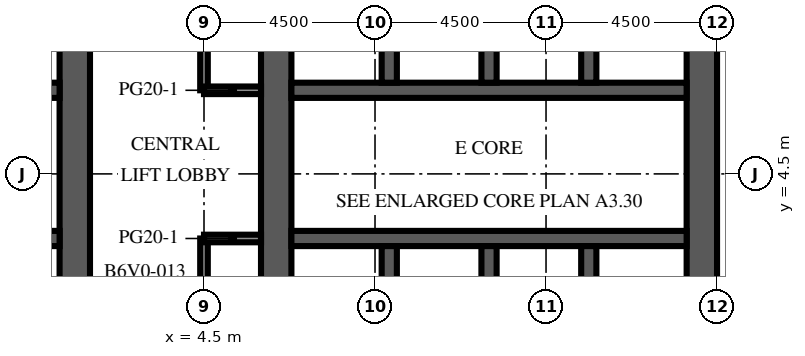
"""IFC4 building model, lengths in metres.
Left out: names, types, materials, properties, quantities, classifications, styles, units other than length and angle.
Written with IfcOpenShell. Run it as: python <this file> out.ifc"""

import sys

from ifc_helpers import new_model, si_unit, direction, frame, frame_2d, origin, place, context, subcontext, project, spatial, rectangle, extrude, element, fill, save


model = new_model("IFC4")
c1 = context("Model", 3, precision=1e-05, world=origin(), true_north=direction((0.0, 1.0)))
c2 = subcontext(c1, "Body", "Model", "MODEL_VIEW")
j1 = project(units=[si_unit("LENGTHUNIT", "METRE"), si_unit("PLANEANGLEUNIT", "RADIAN")], contexts=[c1])
p1 = place(None, origin())
s1 = spatial("IfcSite", under=j1, at=p1, CompositionType="ELEMENT")
p2 = place(p1, origin())
s2 = spatial("IfcBuilding", under=s1, at=p2, CompositionType="ELEMENT")
p3 = place(p2, frame((0.0, 0.0, 195.6)))
s3 = spatial("IfcBuildingStorey", under=s2, at=p3, CompositionType="ELEMENT", Elevation=195.6)
p4 = place(p3, frame((1.1, -9.0, 0.0), z_axis=(0.0, 0.0, 1.0), x_axis=(0.0, 1.0, 0.0)))
e1 = element("IfcWall", 1, at=p4, inside=s3, PredefinedType="SHEAR", context=c2, shape_type="SweptSolid", body=[
    extrude(rectangle(XDim=27.5, YDim=0.8, at=frame_2d((13.75, 0.0))), origin(), (0.0, 0.0, 1.0), 4.1),
])
p5 = place(p4, frame((12.55, 0.0, 0.0)))
e2 = element("IfcOpeningElement", 2, at=p5, cuts=e1, PredefinedType="OPENING", context=c2, shape_type="SweptSolid", body=[
    extrude(rectangle(XDim=2.4, YDim=2.4, at=frame_2d((1.2, 1.2))), frame((0.0, 0.41, 0.0), z_axis=(0.0, -1.0, 0.0), x_axis=(1.0, 0.0, 0.0)), (0.0, 0.0, 1.0), 0.82),
])
p6 = place(p4, frame((3.95, 0.0, 0.0)))
e3 = element("IfcOpeningElement", 3, at=p6, cuts=e1, PredefinedType="OPENING", context=c2, shape_type="SweptSolid", body=[
    extrude(rectangle(XDim=1.2, YDim=2.1, at=frame_2d((0.6, 1.05))), frame((0.0, 0.41, 0.0), z_axis=(0.0, -1.0, 0.0), x_axis=(1.0, 0.0, 0.0)), (0.0, 0.0, 1.0), 0.82),
])
p7 = place(p4, frame((19.45, 0.0, 0.0)))
e4 = element("IfcOpeningElement", 4, at=p7, cuts=e1, PredefinedType="OPENING", context=c2, shape_type="SweptSolid", body=[
    extrude(rectangle(XDim=1.0, YDim=2.1, at=frame_2d((0.5, 1.05))), frame((0.0, 0.41, 0.0), z_axis=(0.0, -1.0, 0.0), x_axis=(1.0, 0.0, 0.0)), (0.0, 0.0, 1.0), 0.82),
])
p8 = place(p4, frame((21.137, 0.0, 0.0)))
e5 = element("IfcOpeningElement", 5, at=p8, cuts=e1, PredefinedType="OPENING", context=c2, shape_type="SweptSolid", body=[
    extrude(rectangle(XDim=1.0, YDim=2.1, at=frame_2d((0.5, 1.05))), frame((0.0, 0.41, 0.0), z_axis=(0.0, -1.0, 0.0), x_axis=(1.0, 0.0, 0.0)), (0.0, 0.0, 1.0), 0.82),
])
p9 = place(p4, frame((23.2, 0.0, 0.0)))
e6 = element("IfcOpeningElement", 6, at=p9, cuts=e1, PredefinedType="OPENING", context=c2, shape_type="SweptSolid", body=[
    extrude(rectangle(XDim=1.0, YDim=2.1, at=frame_2d((0.5, 1.05))), frame((0.0, 0.41, 0.0), z_axis=(0.0, -1.0, 0.0), x_axis=(1.0, 0.0, 0.0)), (0.0, 0.0, 1.0), 0.82),
])
p10 = place(p4, frame((25.262, 0.0, 0.0)))
e7 = element("IfcOpeningElement", 7, at=p10, cuts=e1, PredefinedType="OPENING", context=c2, shape_type="SweptSolid", body=[
    extrude(rectangle(XDim=1.0, YDim=2.1, at=frame_2d((0.5, 1.05))), frame((0.0, 0.41, 0.0), z_axis=(0.0, -1.0, 0.0), x_axis=(1.0, 0.0, 0.0)), (0.0, 0.0, 1.0), 0.82),
])
p11 = place(p3, frame((-9.7, 2.8, 0.0), z_axis=(0.0, 0.0, 1.0), x_axis=(1.0, 0.0, 0.0)))
e8 = element("IfcWall", 8, at=p11, inside=s3, PredefinedType="SHEAR", context=c2, shape_type="SweptSolid", body=[
    extrude(rectangle(XDim=10.4, YDim=0.4, at=frame_2d((5.2, 0.0))), origin(), (0.0, 0.0, 1.0), 4.1),
])
p12 = place(p11, frame((0.738, 0.0, 0.0)))
e9 = element("IfcOpeningElement", 9, at=p12, cuts=e8, PredefinedType="OPENING", context=c2, shape_type="SweptSolid", body=[
    extrude(rectangle(XDim=1.1, YDim=2.1, at=frame_2d((0.55, 1.05))), frame((0.0, 0.21, 0.0), z_axis=(0.0, -1.0, 0.0), x_axis=(1.0, 0.0, 0.0)), (0.0, 0.0, 1.0), 0.42),
])
p13 = place(p11, frame((3.337, 0.0, 0.0)))
e10 = element("IfcOpeningElement", 10, at=p13, cuts=e8, PredefinedType="OPENING", context=c2, shape_type="SweptSolid", body=[
    extrude(rectangle(XDim=1.1, YDim=2.1, at=frame_2d((0.55, 1.05))), frame((0.0, 0.21, 0.0), z_axis=(0.0, -1.0, 0.0), x_axis=(1.0, 0.0, 0.0)), (0.0, 0.0, 1.0), 0.42),
])
p14 = place(p11, frame((6.012, 0.0, 0.0)))
e11 = element("IfcOpeningElement", 11, at=p14, cuts=e8, PredefinedType="OPENING", context=c2, shape_type="SweptSolid", body=[
    extrude(rectangle(XDim=1.0, YDim=2.1, at=frame_2d((0.5, 1.05))), frame((0.0, 0.21, 0.0), z_axis=(0.0, -1.0, 0.0), x_axis=(1.0, 0.0, 0.0)), (0.0, 0.0, 1.0), 0.42),
])
p15 = place(p11, frame((8.613, 0.0, 0.0)))
e12 = element("IfcOpeningElement", 12, at=p15, cuts=e8, PredefinedType="OPENING", context=c2, shape_type="SweptSolid", body=[
    extrude(rectangle(XDim=1.0, YDim=2.1, at=frame_2d((0.5, 1.05))), frame((0.0, 0.21, 0.0), z_axis=(0.0, -1.0, 0.0), x_axis=(1.0, 0.0, 0.0)), (0.0, 0.0, 1.0), 0.42),
])
p16 = place(p3, frame((-9.7, 6.7, 0.0), z_axis=(0.0, 0.0, 1.0), x_axis=(1.0, 0.0, 0.0)))
e13 = element("IfcWall", 13, at=p16, inside=s3, PredefinedType="SHEAR", context=c2, shape_type="SweptSolid", body=[
    extrude(rectangle(XDim=10.4, YDim=0.4, at=frame_2d((5.2, 0.0))), origin(), (0.0, 0.0, 1.0), 4.1),
])
p17 = place(p16, frame((3.337, 0.0, 0.0)))
e14 = element("IfcOpeningElement", 14, at=p17, cuts=e13, PredefinedType="OPENING", context=c2, shape_type="SweptSolid", body=[
    extrude(rectangle(XDim=1.1, YDim=2.1, at=frame_2d((0.55, 1.05))), frame((0.0, 0.21, 0.0), z_axis=(0.0, -1.0, 0.0), x_axis=(1.0, 0.0, 0.0)), (0.0, 0.0, 1.0), 0.42),
])
p18 = place(p16, frame((5.962, 0.0, 0.0)))
e15 = element("IfcOpeningElement", 15, at=p18, cuts=e13, PredefinedType="OPENING", context=c2, shape_type="SweptSolid", body=[
    extrude(rectangle(XDim=1.1, YDim=2.1, at=frame_2d((0.55, 1.05))), frame((0.0, 0.21, 0.0), z_axis=(0.0, -1.0, 0.0), x_axis=(1.0, 0.0, 0.0)), (0.0, 0.0, 1.0), 0.42),
])
p19 = place(p16, frame((8.663, 0.0, 0.0)))
e16 = element("IfcOpeningElement", 16, at=p19, cuts=e13, PredefinedType="OPENING", context=c2, shape_type="SweptSolid", body=[
    extrude(rectangle(XDim=1.1, YDim=2.1, at=frame_2d((0.55, 1.05))), frame((0.0, 0.21, 0.0), z_axis=(0.0, -1.0, 0.0), x_axis=(1.0, 0.0, 0.0)), (0.0, 0.0, 1.0), 0.42),
])
p20 = place(p16, frame((0.688, 0.0, 0.0)))
e17 = element("IfcOpeningElement", 17, at=p20, cuts=e13, PredefinedType="OPENING", context=c2, shape_type="SweptSolid", body=[
    extrude(rectangle(XDim=1.0, YDim=2.1, at=frame_2d((0.5, 1.05))), frame((0.0, 0.21, 0.0), z_axis=(0.0, -1.0, 0.0), x_axis=(1.0, 0.0, 0.0)), (0.0, 0.0, 1.0), 0.42),
])
p21 = place(p3, frame((6.4, -9.0, 0.0), z_axis=(0.0, 0.0, 1.0), x_axis=(0.0, 1.0, 0.0)))
e18 = element("IfcWall", 18, at=p21, inside=s3, PredefinedType="SHEAR", context=c2, shape_type="SweptSolid", body=[
    extrude(rectangle(XDim=27.5, YDim=0.8, at=frame_2d((13.75, 0.0))), origin(), (0.0, 0.0, 1.0), 4.1),
])
p22 = place(p21, frame((12.55, 0.0, 0.0)))
e19 = element("IfcOpeningElement", 19, at=p22, cuts=e18, PredefinedType="OPENING", context=c2, shape_type="SweptSolid", body=[
    extrude(rectangle(XDim=2.4, YDim=2.4, at=frame_2d((1.2, 1.2))), frame((0.0, 0.41, 0.0), z_axis=(0.0, -1.0, 0.0), x_axis=(1.0, 0.0, 0.0)), (0.0, 0.0, 1.0), 0.82),
])
p23 = place(p21, frame((3.95, 0.0, 0.0)))
e20 = element("IfcOpeningElement", 20, at=p23, cuts=e18, PredefinedType="OPENING", context=c2, shape_type="SweptSolid", body=[
    extrude(rectangle(XDim=1.2, YDim=2.1, at=frame_2d((0.6, 1.05))), frame((0.0, 0.41, 0.0), z_axis=(0.0, -1.0, 0.0), x_axis=(1.0, 0.0, 0.0)), (0.0, 0.0, 1.0), 0.82),
])
p24 = place(p21, frame((19.45, 0.0, 0.0)))
e21 = element("IfcOpeningElement", 21, at=p24, cuts=e18, PredefinedType="OPENING", context=c2, shape_type="SweptSolid", body=[
    extrude(rectangle(XDim=1.0, YDim=2.1, at=frame_2d((0.5, 1.05))), frame((0.0, 0.41, 0.0), z_axis=(0.0, -1.0, 0.0), x_axis=(1.0, 0.0, 0.0)), (0.0, 0.0, 1.0), 0.82),
])
p25 = place(p21, frame((21.137, 0.0, 0.0)))
e22 = element("IfcOpeningElement", 22, at=p25, cuts=e18, PredefinedType="OPENING", context=c2, shape_type="SweptSolid", body=[
    extrude(rectangle(XDim=1.0, YDim=2.1, at=frame_2d((0.5, 1.05))), frame((0.0, 0.41, 0.0), z_axis=(0.0, -1.0, 0.0), x_axis=(1.0, 0.0, 0.0)), (0.0, 0.0, 1.0), 0.82),
])
p26 = place(p21, frame((23.2, 0.0, 0.0)))
e23 = element("IfcOpeningElement", 23, at=p26, cuts=e18, PredefinedType="OPENING", context=c2, shape_type="SweptSolid", body=[
    extrude(rectangle(XDim=1.0, YDim=2.1, at=frame_2d((0.5, 1.05))), frame((0.0, 0.41, 0.0), z_axis=(0.0, -1.0, 0.0), x_axis=(1.0, 0.0, 0.0)), (0.0, 0.0, 1.0), 0.82),
])
p27 = place(p21, frame((25.262, 0.0, 0.0)))
e24 = element("IfcOpeningElement", 24, at=p27, cuts=e18, PredefinedType="OPENING", context=c2, shape_type="SweptSolid", body=[
    extrude(rectangle(XDim=1.0, YDim=2.1, at=frame_2d((0.5, 1.05))), frame((0.0, 0.41, 0.0), z_axis=(0.0, -1.0, 0.0), x_axis=(1.0, 0.0, 0.0)), (0.0, 0.0, 1.0), 0.82),
])
p28 = place(p3, frame((17.6, -9.0, 0.0), z_axis=(0.0, 0.0, 1.0), x_axis=(0.0, 1.0, 0.0)))
e25 = element("IfcWall", 25, at=p28, inside=s3, PredefinedType="SHEAR", context=c2, shape_type="SweptSolid", body=[
    extrude(rectangle(XDim=27.5, YDim=0.8, at=frame_2d((13.75, 0.0))), origin(), (0.0, 0.0, 1.0), 4.1),
])
p29 = place(p28, frame((12.55, 0.0, 0.0)))
e26 = element("IfcOpeningElement", 26, at=p29, cuts=e25, PredefinedType="OPENING", context=c2, shape_type="SweptSolid", body=[
    extrude(rectangle(XDim=2.4, YDim=2.4, at=frame_2d((1.2, 1.2))), frame((0.0, 0.41, 0.0), z_axis=(0.0, -1.0, 0.0), x_axis=(1.0, 0.0, 0.0)), (0.0, 0.0, 1.0), 0.82),
])
p30 = place(p28, frame((6.825, 0.0, 0.0)))
e27 = element("IfcOpeningElement", 27, at=p30, cuts=e25, PredefinedType="OPENING", context=c2, shape_type="SweptSolid", body=[
    extrude(rectangle(XDim=1.2, YDim=2.1, at=frame_2d((0.6, 1.05))), frame((0.0, 0.41, 0.0), z_axis=(0.0, -1.0, 0.0), x_axis=(1.0, 0.0, 0.0)), (0.0, 0.0, 1.0), 0.82),
])
p31 = place(p28, frame((19.475, 0.0, 0.0)))
e28 = element("IfcOpeningElement", 28, at=p31, cuts=e25, PredefinedType="OPENING", context=c2, shape_type="SweptSolid", body=[
    extrude(rectangle(XDim=1.2, YDim=2.1, at=frame_2d((0.6, 1.05))), frame((0.0, 0.41, 0.0), z_axis=(0.0, -1.0, 0.0), x_axis=(1.0, 0.0, 0.0)), (0.0, 0.0, 1.0), 0.82),
])
p32 = place(p3, frame((6.8, 2.8, 0.0), z_axis=(0.0, 0.0, 1.0), x_axis=(1.0, 0.0, 0.0)))
e29 = element("IfcWall", 29, at=p32, inside=s3, PredefinedType="SHEAR", context=c2, shape_type="SweptSolid", body=[
    extrude(rectangle(XDim=10.4, YDim=0.4, at=frame_2d((5.2, 0.0))), origin(), (0.0, 0.0, 1.0), 4.1),
])
p33 = place(p32, frame((0.738, 0.0, 0.0)))
e30 = element("IfcOpeningElement", 30, at=p33, cuts=e29, PredefinedType="OPENING", context=c2, shape_type="SweptSolid", body=[
    extrude(rectangle(XDim=1.1, YDim=2.1, at=frame_2d((0.55, 1.05))), frame((0.0, 0.21, 0.0), z_axis=(0.0, -1.0, 0.0), x_axis=(1.0, 0.0, 0.0)), (0.0, 0.0, 1.0), 0.42),
])
p34 = place(p32, frame((3.337, 0.0, 0.0)))
e31 = element("IfcOpeningElement", 31, at=p34, cuts=e29, PredefinedType="OPENING", context=c2, shape_type="SweptSolid", body=[
    extrude(rectangle(XDim=1.1, YDim=2.1, at=frame_2d((0.55, 1.05))), frame((0.0, 0.21, 0.0), z_axis=(0.0, -1.0, 0.0), x_axis=(1.0, 0.0, 0.0)), (0.0, 0.0, 1.0), 0.42),
])
p35 = place(p32, frame((6.012, 0.0, 0.0)))
e32 = element("IfcOpeningElement", 32, at=p35, cuts=e29, PredefinedType="OPENING", context=c2, shape_type="SweptSolid", body=[
    extrude(rectangle(XDim=1.0, YDim=2.1, at=frame_2d((0.5, 1.05))), frame((0.0, 0.21, 0.0), z_axis=(0.0, -1.0, 0.0), x_axis=(1.0, 0.0, 0.0)), (0.0, 0.0, 1.0), 0.42),
])
p36 = place(p32, frame((8.613, 0.0, 0.0)))
e33 = element("IfcOpeningElement", 33, at=p36, cuts=e29, PredefinedType="OPENING", context=c2, shape_type="SweptSolid", body=[
    extrude(rectangle(XDim=1.0, YDim=2.1, at=frame_2d((0.5, 1.05))), frame((0.0, 0.21, 0.0), z_axis=(0.0, -1.0, 0.0), x_axis=(1.0, 0.0, 0.0)), (0.0, 0.0, 1.0), 0.42),
])
p37 = place(p3, frame((6.8, 6.7, 0.0), z_axis=(0.0, 0.0, 1.0), x_axis=(1.0, 0.0, 0.0)))
e34 = element("IfcWall", 34, at=p37, inside=s3, PredefinedType="SHEAR", context=c2, shape_type="SweptSolid", body=[
    extrude(rectangle(XDim=10.4, YDim=0.4, at=frame_2d((5.2, 0.0))), origin(), (0.0, 0.0, 1.0), 4.1),
])
p38 = place(p37, frame((3.337, 0.0, 0.0)))
e35 = element("IfcOpeningElement", 35, at=p38, cuts=e34, PredefinedType="OPENING", context=c2, shape_type="SweptSolid", body=[
    extrude(rectangle(XDim=1.1, YDim=2.1, at=frame_2d((0.55, 1.05))), frame((0.0, 0.21, 0.0), z_axis=(0.0, -1.0, 0.0), x_axis=(1.0, 0.0, 0.0)), (0.0, 0.0, 1.0), 0.42),
])
p39 = place(p37, frame((5.962, 0.0, 0.0)))
e36 = element("IfcOpeningElement", 36, at=p39, cuts=e34, PredefinedType="OPENING", context=c2, shape_type="SweptSolid", body=[
    extrude(rectangle(XDim=1.1, YDim=2.1, at=frame_2d((0.55, 1.05))), frame((0.0, 0.21, 0.0), z_axis=(0.0, -1.0, 0.0), x_axis=(1.0, 0.0, 0.0)), (0.0, 0.0, 1.0), 0.42),
])
p40 = place(p37, frame((8.663, 0.0, 0.0)))
e37 = element("IfcOpeningElement", 37, at=p40, cuts=e34, PredefinedType="OPENING", context=c2, shape_type="SweptSolid", body=[
    extrude(rectangle(XDim=1.1, YDim=2.1, at=frame_2d((0.55, 1.05))), frame((0.0, 0.21, 0.0), z_axis=(0.0, -1.0, 0.0), x_axis=(1.0, 0.0, 0.0)), (0.0, 0.0, 1.0), 0.42),
])
p41 = place(p37, frame((0.688, 0.0, 0.0)))
e38 = element("IfcOpeningElement", 38, at=p41, cuts=e34, PredefinedType="OPENING", context=c2, shape_type="SweptSolid", body=[
    extrude(rectangle(XDim=1.0, YDim=2.1, at=frame_2d((0.5, 1.05))), frame((0.0, 0.21, 0.0), z_axis=(0.0, -1.0, 0.0), x_axis=(1.0, 0.0, 0.0)), (0.0, 0.0, 1.0), 0.42),
])
for number, where, z_axis, x_axis in (
    (39, (9.375, -0.3, 0.0), (0.0, 0.0, 1.0), (0.0, 1.0, 0.0)),
    (40, (9.375, 6.9, 0.0), (0.0, 0.0, 1.0), (0.0, 1.0, 0.0)),
    (41, (12.0, -0.3, 0.0), (0.0, 0.0, 1.0), (0.0, 1.0, 0.0)),
    (42, (12.0, 6.9, 0.0), (0.0, 0.0, 1.0), (0.0, 1.0, 0.0)),
    (43, (14.625, -0.3, 0.0), (0.0, 0.0, 1.0), (0.0, 1.0, 0.0)),
    (44, (14.625, 6.9, 0.0), (0.0, 0.0, 1.0), (0.0, 1.0, 0.0)),
):
    element("IfcWall", number, at=place(p3, frame(where, z_axis=z_axis, x_axis=x_axis)), inside=s3, PredefinedType="SHEAR", context=c2, shape_type="SweptSolid", body=[
        extrude(rectangle(XDim=2.9, YDim=0.4, at=frame_2d((1.45, 0.0))), origin(), (0.0, 0.0, 1.0), 4.1),
    ])
p42 = place(p3, frame((4.5, 2.8, 0.0), z_axis=(0.0, 0.0, 1.0), x_axis=(0.0, -1.0, 0.0)))
e45 = element("IfcWall", 45, at=p42, inside=s3, PredefinedType="PARTITIONING", context=c2, shape_type="SweptSolid", body=[
    extrude(rectangle(XDim=6.3, YDim=0.2, at=frame_2d((3.15, 0.0))), origin(), (0.0, 0.0, 1.0), 3.65),
])
p43 = place(p42, frame((1.95, 0.0, 0.0)))
e46 = element("IfcOpeningElement", 46, at=p43, cuts=e45, PredefinedType="OPENING", context=c2, shape_type="SweptSolid", body=[
    extrude(rectangle(XDim=1.0, YDim=2.1, at=frame_2d((0.5, 1.05))), frame((0.0, 0.11, 0.0), z_axis=(0.0, -1.0, 0.0), x_axis=(1.0, 0.0, 0.0)), (0.0, 0.0, 1.0), 0.22),
])
p44 = place(p3, frame((4.5, 18.5, 0.0), z_axis=(0.0, 0.0, 1.0), x_axis=(0.0, -1.0, 0.0)))
e47 = element("IfcWall", 47, at=p44, inside=s3, PredefinedType="PARTITIONING", context=c2, shape_type="SweptSolid", body=[
    extrude(rectangle(XDim=11.8, YDim=0.2, at=frame_2d((5.9, 0.0))), origin(), (0.0, 0.0, 1.0), 3.65),
])
p45 = place(p44, frame((4.95, 0.0, 0.0)))
e48 = element("IfcOpeningElement", 48, at=p45, cuts=e47, PredefinedType="OPENING", context=c2, shape_type="SweptSolid", body=[
    extrude(rectangle(XDim=1.0, YDim=2.1, at=frame_2d((0.5, 1.05))), frame((0.0, 0.11, 0.0), z_axis=(0.0, -1.0, 0.0), x_axis=(1.0, 0.0, 0.0)), (0.0, 0.0, 1.0), 0.22),
])
for number, where, z_axis, x_axis in (
    (49, (4.5, 2.8, 0.0), (0.0, 0.0, 1.0), (1.0, 0.0, 0.0)),
    (50, (4.5, 6.7, 0.0), (0.0, 0.0, 1.0), (1.0, 0.0, 0.0)),
):
    element("IfcWall", number, at=place(p3, frame(where, z_axis=z_axis, x_axis=x_axis)), inside=s3, PredefinedType="PARTITIONING", context=c2, shape_type="SweptSolid", body=[
        extrude(rectangle(XDim=1.5, YDim=0.2, at=frame_2d((0.75, 0.0))), origin(), (0.0, 0.0, 1.0), 3.65),
    ])
p46 = place(p33, origin())
e51 = element("IfcDoor", 51, at=p46, inside=s3, OperationType="DOUBLE_DOOR_SLIDING", PredefinedType="DOOR", context=c2, shape_type="SweptSolid", body=[
    extrude(rectangle(XDim=1.1, YDim=2.1, at=frame_2d((0.55, 1.05))), frame((0.0, 0.025, 0.0), z_axis=(0.0, -1.0, 0.0), x_axis=(1.0, 0.0, 0.0)), (0.0, 0.0, 1.0), 0.05),
])
fill(e30, e51)
p47 = place(p34, origin())
e52 = element("IfcDoor", 52, at=p47, inside=s3, OperationType="DOUBLE_DOOR_SLIDING", PredefinedType="DOOR", context=c2, shape_type="SweptSolid", body=[
    extrude(rectangle(XDim=1.1, YDim=2.1, at=frame_2d((0.55, 1.05))), frame((0.0, 0.025, 0.0), z_axis=(0.0, -1.0, 0.0), x_axis=(1.0, 0.0, 0.0)), (0.0, 0.0, 1.0), 0.05),
])
fill(e31, e52)
p48 = place(p38, origin())
e53 = element("IfcDoor", 53, at=p48, inside=s3, OperationType="DOUBLE_DOOR_SLIDING", PredefinedType="DOOR", context=c2, shape_type="SweptSolid", body=[
    extrude(rectangle(XDim=1.1, YDim=2.1, at=frame_2d((0.55, 1.05))), frame((0.0, 0.025, 0.0), z_axis=(0.0, -1.0, 0.0), x_axis=(1.0, 0.0, 0.0)), (0.0, 0.0, 1.0), 0.05),
])
fill(e35, e53)
p49 = place(p39, origin())
e54 = element("IfcDoor", 54, at=p49, inside=s3, OperationType="DOUBLE_DOOR_SLIDING", PredefinedType="DOOR", context=c2, shape_type="SweptSolid", body=[
    extrude(rectangle(XDim=1.1, YDim=2.1, at=frame_2d((0.55, 1.05))), frame((0.0, 0.025, 0.0), z_axis=(0.0, -1.0, 0.0), x_axis=(1.0, 0.0, 0.0)), (0.0, 0.0, 1.0), 0.05),
])
fill(e36, e54)
p50 = place(p40, origin())
e55 = element("IfcDoor", 55, at=p50, inside=s3, OperationType="DOUBLE_DOOR_SLIDING", PredefinedType="DOOR", context=c2, shape_type="SweptSolid", body=[
    extrude(rectangle(XDim=1.1, YDim=2.1, at=frame_2d((0.55, 1.05))), frame((0.0, 0.025, 0.0), z_axis=(0.0, -1.0, 0.0), x_axis=(1.0, 0.0, 0.0)), (0.0, 0.0, 1.0), 0.05),
])
fill(e37, e55)
p51 = place(p5, origin())
e56 = element("IfcDoor", 56, at=p51, inside=s3, OperationType="DOUBLE_DOOR_DOUBLE_SWING", PredefinedType="DOOR", context=c2, shape_type="SweptSolid", body=[
    extrude(rectangle(XDim=2.4, YDim=2.4, at=frame_2d((1.2, 1.2))), frame((0.0, 0.025, 0.0), z_axis=(0.0, -1.0, 0.0), x_axis=(1.0, 0.0, 0.0)), (0.0, 0.0, 1.0), 0.05),
])
fill(e2, e56)
p52 = place(p22, origin())
e57 = element("IfcDoor", 57, at=p52, inside=s3, OperationType="DOUBLE_DOOR_DOUBLE_SWING", PredefinedType="DOOR", context=c2, shape_type="SweptSolid", body=[
    extrude(rectangle(XDim=2.4, YDim=2.4, at=frame_2d((1.2, 1.2))), frame((0.0, 0.025, 0.0), z_axis=(0.0, -1.0, 0.0), x_axis=(1.0, 0.0, 0.0)), (0.0, 0.0, 1.0), 0.05),
])
fill(e19, e57)
p53 = place(p29, origin())
e58 = element("IfcDoor", 58, at=p53, inside=s3, OperationType="DOUBLE_DOOR_DOUBLE_SWING", PredefinedType="DOOR", context=c2, shape_type="SweptSolid", body=[
    extrude(rectangle(XDim=2.4, YDim=2.4, at=frame_2d((1.2, 1.2))), frame((0.0, 0.025, 0.0), z_axis=(0.0, -1.0, 0.0), x_axis=(1.0, 0.0, 0.0)), (0.0, 0.0, 1.0), 0.05),
])
fill(e26, e58)
p54 = place(p35, origin())
e59 = element("IfcDoor", 59, at=p54, inside=s3, OperationType="SINGLE_SWING_LEFT", PredefinedType="DOOR", context=c2, shape_type="SweptSolid", body=[
    extrude(rectangle(XDim=1.0, YDim=2.1, at=frame_2d((0.5, 1.05))), frame((0.0, 0.025, 0.0), z_axis=(0.0, -1.0, 0.0), x_axis=(1.0, 0.0, 0.0)), (0.0, 0.0, 1.0), 0.05),
])
fill(e32, e59)
p55 = place(p36, origin())
e60 = element("IfcDoor", 60, at=p55, inside=s3, OperationType="SINGLE_SWING_RIGHT", PredefinedType="DOOR", context=c2, shape_type="SweptSolid", body=[
    extrude(rectangle(XDim=1.0, YDim=2.1, at=frame_2d((0.5, 1.05))), frame((0.0, 0.025, 0.0), z_axis=(0.0, -1.0, 0.0), x_axis=(1.0, 0.0, 0.0)), (0.0, 0.0, 1.0), 0.05),
])
fill(e33, e60)
p56 = place(p41, origin())
e61 = element("IfcDoor", 61, at=p56, inside=s3, OperationType="SINGLE_SWING_LEFT", PredefinedType="DOOR", context=c2, shape_type="SweptSolid", body=[
    extrude(rectangle(XDim=1.0, YDim=2.1, at=frame_2d((0.5, 1.05))), frame((0.0, 0.025, 0.0), z_axis=(0.0, -1.0, 0.0), x_axis=(1.0, 0.0, 0.0)), (0.0, 0.0, 1.0), 0.05),
])
fill(e38, e61)
save(model, sys.argv[1])
